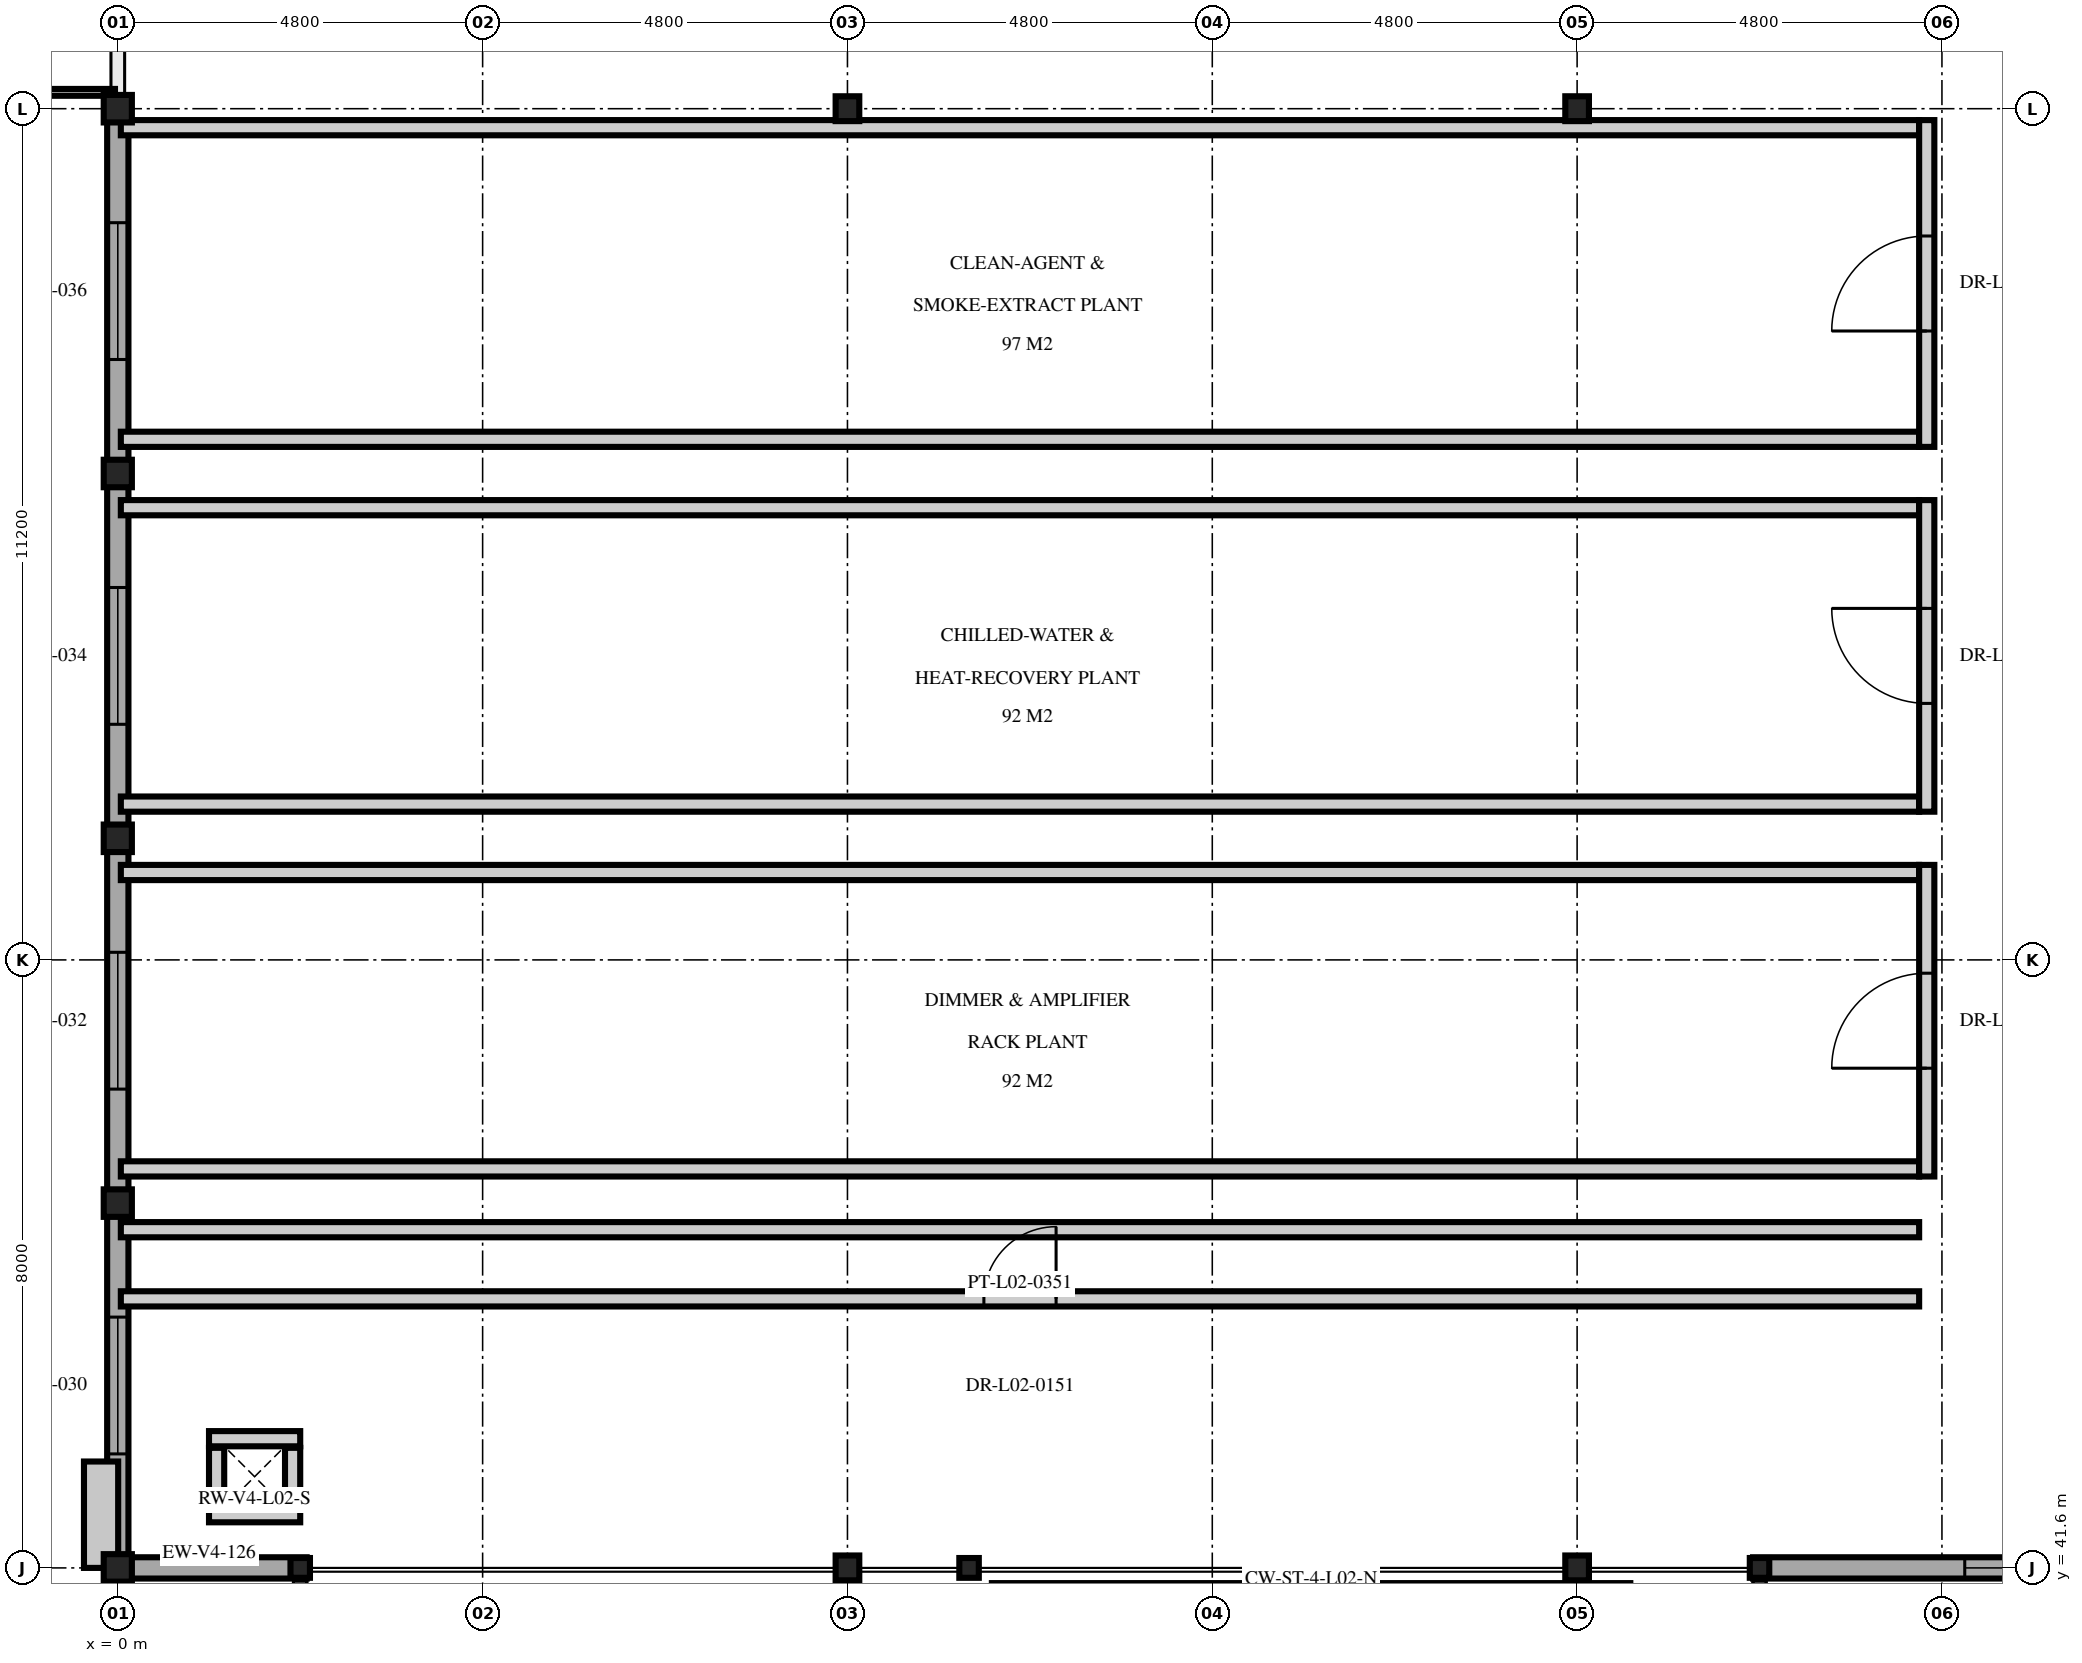
"""IFC4 building model, lengths in metres.
Left out: names, types, materials, properties, quantities, classifications, styles, units other than length and angle.
Written with IfcOpenShell. Run it as: python <this file> out.ifc"""

import sys

from ifc_helpers import new_model, si_unit, direction, frame, frame_2d, origin, origin_2d, place, context, subcontext, project, spatial, rectangle, i_section, extrude, element, fill, save


model = new_model("IFC4")
c1 = context("Model", 3, precision=1e-05, world=origin(), true_north=direction((0.0, 1.0)))
c2 = subcontext(c1, "Body", "Model", "MODEL_VIEW")
j1 = project(units=[si_unit("LENGTHUNIT", "METRE"), si_unit("PLANEANGLEUNIT", "RADIAN")], contexts=[c1])
p1 = place(None, origin())
s1 = spatial("IfcSite", under=j1, at=p1, CompositionType="ELEMENT")
p2 = place(p1, origin())
s2 = spatial("IfcBuilding", under=s1, at=p2, CompositionType="ELEMENT")
p3 = place(p2, frame((0.0, 0.0, 9.6)))
s3 = spatial("IfcBuildingStorey", under=s2, at=p3, CompositionType="ELEMENT", Elevation=9.6)
for number, where, z_axis, x_axis in (
    (1, (0.0, 41.6, 0.0), (0.0, 0.0, 1.0), (1.0, 0.0, 0.0)),
    (2, (0.0, 46.4, 0.0), (0.0, 0.0, 1.0), (1.0, 0.0, 0.0)),
    (3, (0.0, 51.2, 0.0), (0.0, 0.0, 1.0), (1.0, 0.0, 0.0)),
    (4, (0.0, 56.0, 0.0), (0.0, 0.0, 1.0), (1.0, 0.0, 0.0)),
    (5, (0.0, 60.8, 0.0), (0.0, 0.0, 1.0), (1.0, 0.0, 0.0)),
):
    element("IfcColumn", number, at=place(p3, frame(where, z_axis=z_axis, x_axis=x_axis)), inside=s3, PredefinedType="COLUMN", context=c2, shape_type="SweptSolid", body=[
        extrude(i_section(OverallWidth=0.371, OverallDepth=0.362, WebThickness=0.012, FlangeThickness=0.021, at=origin_2d()), origin(), (0.0, 0.0, 1.0), 4.5),
    ])
for number, where, z_axis, x_axis in (
    (6, (9.6, 41.6, 0.0), (0.0, 0.0, 1.0), (1.0, 0.0, 0.0)),
    (7, (9.6, 60.8, 0.0), (0.0, 0.0, 1.0), (1.0, 0.0, 0.0)),
    (8, (19.2, 41.6, 0.0), (0.0, 0.0, 1.0), (1.0, 0.0, 0.0)),
    (9, (19.2, 60.8, 0.0), (0.0, 0.0, 1.0), (1.0, 0.0, 0.0)),
):
    element("IfcColumn", number, at=place(p3, frame(where, z_axis=z_axis, x_axis=x_axis)), inside=s3, PredefinedType="COLUMN", context=c2, shape_type="SweptSolid", body=[
        extrude(i_section(OverallWidth=0.311, OverallDepth=0.327, WebThickness=0.016, FlangeThickness=0.025, at=origin_2d()), origin(), (0.0, 0.0, 1.0), 4.5),
    ])
for number, where, z_axis, x_axis in (
    (10, (2.4, 41.6, 0.0), (0.0, 0.0, 1.0), (1.0, 0.0, 0.0)),
    (11, (11.2, 41.6, 0.0), (0.0, 0.0, 1.0), (1.0, 0.0, 0.0)),
    (12, (21.6, 41.6, 0.0), (0.0, 0.0, 1.0), (1.0, 0.0, 0.0)),
):
    element("IfcColumn", number, at=place(p3, frame(where, z_axis=z_axis, x_axis=x_axis)), inside=s3, PredefinedType="COLUMN", context=c2, shape_type="SweptSolid", body=[
        extrude(i_section(OverallWidth=0.256, OverallDepth=0.26, WebThickness=0.01, FlangeThickness=0.017, at=origin_2d()), origin(), (0.0, 0.0, 1.0), 4.5),
    ])
p4 = place(p3, frame((11.5, 41.25, 0.0), z_axis=(0.0, 0.0, 1.0), x_axis=(1.0, 0.0, 0.0)))
e13 = element("IfcWall", 13, at=p4, inside=s3, PredefinedType="SHEAR", context=c2, shape_type="SweptSolid", body=[
    extrude(rectangle(XDim=8.4, YDim=0.3, at=frame_2d((4.2, 0.0))), origin(), (0.0, 0.0, 1.0), 4.26),
])
for number, where, z_axis, x_axis in (
    (14, (2.4, 42.3, 0.0), (0.0, 0.0, 1.0), (-1.0, 0.0, 0.0)),
    (15, (1.2, 43.3, 0.0), (0.0, 0.0, 1.0), (1.0, 0.0, 0.0)),
):
    element("IfcWall", number, at=place(p3, frame(where, z_axis=z_axis, x_axis=x_axis)), inside=s3, PredefinedType="PARTITIONING", context=c2, shape_type="SweptSolid", body=[
        extrude(rectangle(XDim=1.2, YDim=0.2, at=frame_2d((0.6, 0.0))), origin(), (0.0, 0.0, 1.0), 3.76),
    ])
for number, where, z_axis, x_axis in (
    (16, (1.3, 42.42, 0.0), (0.0, 0.0, 1.0), (0.0, 1.0, 0.0)),
    (17, (2.3, 43.18, 0.0), (0.0, 0.0, 1.0), (0.0, -1.0, 0.0)),
):
    element("IfcWall", number, at=place(p3, frame(where, z_axis=z_axis, x_axis=x_axis)), inside=s3, PredefinedType="PARTITIONING", context=c2, shape_type="SweptSolid", body=[
        extrude(rectangle(XDim=0.76, YDim=0.2, at=frame_2d((0.38, 0.0))), origin(), (0.0, 0.0, 1.0), 3.76),
    ])
p5 = place(p3, frame((2.485, 41.6, 0.0), z_axis=(0.0, 0.0, 1.0), x_axis=(-1.0, 0.0, 0.0)))
e18 = element("IfcWall", 18, at=p5, inside=s3, PredefinedType="SOLIDWALL", context=c2, shape_type="SweptSolid", body=[
    extrude(rectangle(XDim=2.57, YDim=0.28, at=frame_2d((1.285, 0.0))), origin(), (0.0, 0.0, 1.0), 3.702),
])
p6 = place(p3, frame((28.885, 41.6, 0.0), z_axis=(0.0, 0.0, 1.0), x_axis=(-1.0, 0.0, 0.0)))
e19 = element("IfcWall", 19, at=p6, inside=s3, PredefinedType="SOLIDWALL", context=c2, shape_type="SweptSolid", body=[
    extrude(rectangle(XDim=7.37, YDim=0.28, at=frame_2d((3.685, 0.0))), origin(), (0.0, 0.0, 1.0), 3.702),
])
p7 = place(p6, frame((2.785, 0.0, 1.0)))
e20 = element("IfcOpeningElement", 20, at=p7, cuts=e19, PredefinedType="OPENING", context=c2, shape_type="SweptSolid", body=[
    extrude(rectangle(XDim=1.8, YDim=2.1, at=frame_2d((0.9, 1.05))), frame((0.0, 0.15, 0.0), z_axis=(0.0, -1.0, 0.0), x_axis=(1.0, 0.0, 0.0)), (0.0, 0.0, 1.0), 0.3),
])
p8 = place(p3, frame((0.0, 41.515, 0.0), z_axis=(0.0, 0.0, 1.0), x_axis=(0.0, 1.0, 0.0)))
e21 = element("IfcWall", 21, at=p8, inside=s3, PredefinedType="SOLIDWALL", context=c2, shape_type="SweptSolid", body=[
    extrude(rectangle(XDim=4.97, YDim=0.28, at=frame_2d((2.485, 0.0))), origin(), (0.0, 0.0, 1.0), 3.635),
])
p9 = place(p8, frame((1.585, 0.0, 1.0)))
e22 = element("IfcOpeningElement", 22, at=p9, cuts=e21, PredefinedType="OPENING", context=c2, shape_type="SweptSolid", body=[
    extrude(rectangle(XDim=1.8, YDim=2.1, at=frame_2d((0.9, 1.05))), frame((0.0, 0.15, 0.0), z_axis=(0.0, -1.0, 0.0), x_axis=(1.0, 0.0, 0.0)), (0.0, 0.0, 1.0), 0.3),
])
p10 = place(p3, frame((0.0, 46.315, 0.0), z_axis=(0.0, 0.0, 1.0), x_axis=(0.0, 1.0, 0.0)))
e23 = element("IfcWall", 23, at=p10, inside=s3, PredefinedType="SOLIDWALL", context=c2, shape_type="SweptSolid", body=[
    extrude(rectangle(XDim=4.97, YDim=0.28, at=frame_2d((2.485, 0.0))), origin(), (0.0, 0.0, 1.0), 3.635),
])
p11 = place(p10, frame((1.585, 0.0, 1.0)))
e24 = element("IfcOpeningElement", 24, at=p11, cuts=e23, PredefinedType="OPENING", context=c2, shape_type="SweptSolid", body=[
    extrude(rectangle(XDim=1.8, YDim=2.1, at=frame_2d((0.9, 1.05))), frame((0.0, 0.15, 0.0), z_axis=(0.0, -1.0, 0.0), x_axis=(1.0, 0.0, 0.0)), (0.0, 0.0, 1.0), 0.3),
])
p12 = place(p3, frame((0.0, 51.115, 0.0), z_axis=(0.0, 0.0, 1.0), x_axis=(0.0, 1.0, 0.0)))
e25 = element("IfcWall", 25, at=p12, inside=s3, PredefinedType="SOLIDWALL", context=c2, shape_type="SweptSolid", body=[
    extrude(rectangle(XDim=4.97, YDim=0.28, at=frame_2d((2.485, 0.0))), origin(), (0.0, 0.0, 1.0), 3.635),
])
p13 = place(p12, frame((1.585, 0.0, 1.0)))
e26 = element("IfcOpeningElement", 26, at=p13, cuts=e25, PredefinedType="OPENING", context=c2, shape_type="SweptSolid", body=[
    extrude(rectangle(XDim=1.8, YDim=2.1, at=frame_2d((0.9, 1.05))), frame((0.0, 0.15, 0.0), z_axis=(0.0, -1.0, 0.0), x_axis=(1.0, 0.0, 0.0)), (0.0, 0.0, 1.0), 0.3),
])
p14 = place(p3, frame((0.0, 55.915, 0.0), z_axis=(0.0, 0.0, 1.0), x_axis=(0.0, 1.0, 0.0)))
e27 = element("IfcWall", 27, at=p14, inside=s3, PredefinedType="SOLIDWALL", context=c2, shape_type="SweptSolid", body=[
    extrude(rectangle(XDim=4.97, YDim=0.28, at=frame_2d((2.485, 0.0))), origin(), (0.0, 0.0, 1.0), 3.635),
])
p15 = place(p14, frame((1.585, 0.0, 1.0)))
e28 = element("IfcOpeningElement", 28, at=p15, cuts=e27, PredefinedType="OPENING", context=c2, shape_type="SweptSolid", body=[
    extrude(rectangle(XDim=1.8, YDim=2.1, at=frame_2d((0.9, 1.05))), frame((0.0, 0.15, 0.0), z_axis=(0.0, -1.0, 0.0), x_axis=(1.0, 0.0, 0.0)), (0.0, 0.0, 1.0), 0.3),
])
p16 = place(p3, frame((0.04, 45.14, 0.0), z_axis=(0.0, 0.0, 1.0), x_axis=(1.0, 0.0, 0.0)))
e29 = element("IfcWall", 29, at=p16, inside=s3, PredefinedType="PARTITIONING", context=c2, shape_type="SweptSolid", body=[
    extrude(rectangle(XDim=23.66, YDim=0.2, at=frame_2d((11.83, 0.0))), origin(), (0.0, 0.0, 1.0), 3.702),
])
p17 = place(p16, frame((11.355, 0.0, 0.0)))
e30 = element("IfcOpeningElement", 30, at=p17, cuts=e29, PredefinedType="OPENING", context=c2, shape_type="SweptSolid", body=[
    extrude(rectangle(XDim=0.95, YDim=2.1, at=frame_2d((0.475, 1.05))), frame((0.0, 0.11, 0.0), z_axis=(0.0, -1.0, 0.0), x_axis=(1.0, 0.0, 0.0)), (0.0, 0.0, 1.0), 0.22),
])
for number, where, z_axis, x_axis in (
    (31, (0.04, 46.05, 0.0), (0.0, 0.0, 1.0), (1.0, 0.0, 0.0)),
    (32, (0.04, 46.85, 0.0), (0.0, 0.0, 1.0), (1.0, 0.0, 0.0)),
    (33, (0.04, 50.75, 0.0), (0.0, 0.0, 1.0), (1.0, 0.0, 0.0)),
):
    element("IfcWall", number, at=place(p3, frame(where, z_axis=z_axis, x_axis=x_axis)), inside=s3, PredefinedType="PARTITIONING", context=c2, shape_type="SweptSolid", body=[
        extrude(rectangle(XDim=23.66, YDim=0.2, at=frame_2d((11.83, 0.0))), origin(), (0.0, 0.0, 1.0), 3.702),
    ])
p18 = place(p3, frame((23.8, 46.75, 0.0), z_axis=(0.0, 0.0, 1.0), x_axis=(0.0, 1.0, 0.0)))
e34 = element("IfcWall", 34, at=p18, inside=s3, PredefinedType="PARTITIONING", context=c2, shape_type="SweptSolid", body=[
    extrude(rectangle(XDim=4.1, YDim=0.2, at=frame_2d((2.05, 0.0))), origin(), (0.0, 0.0, 1.0), 4.26),
])
p19 = place(p18, frame((1.425, 0.0, 0.0)))
e35 = element("IfcOpeningElement", 35, at=p19, cuts=e34, PredefinedType="OPENING", context=c2, shape_type="SweptSolid", body=[
    extrude(rectangle(XDim=1.25, YDim=2.25, at=frame_2d((0.625, 1.125))), frame((0.0, 0.11, 0.0), z_axis=(0.0, -1.0, 0.0), x_axis=(1.0, 0.0, 0.0)), (0.0, 0.0, 1.0), 0.22),
])
for number, where, z_axis, x_axis in (
    (36, (0.04, 51.65, 0.0), (0.0, 0.0, 1.0), (1.0, 0.0, 0.0)),
    (37, (0.04, 55.55, 0.0), (0.0, 0.0, 1.0), (1.0, 0.0, 0.0)),
):
    element("IfcWall", number, at=place(p3, frame(where, z_axis=z_axis, x_axis=x_axis)), inside=s3, PredefinedType="PARTITIONING", context=c2, shape_type="SweptSolid", body=[
        extrude(rectangle(XDim=23.66, YDim=0.2, at=frame_2d((11.83, 0.0))), origin(), (0.0, 0.0, 1.0), 3.702),
    ])
p20 = place(p3, frame((23.8, 51.55, 0.0), z_axis=(0.0, 0.0, 1.0), x_axis=(0.0, 1.0, 0.0)))
e38 = element("IfcWall", 38, at=p20, inside=s3, PredefinedType="PARTITIONING", context=c2, shape_type="SweptSolid", body=[
    extrude(rectangle(XDim=4.1, YDim=0.2, at=frame_2d((2.05, 0.0))), origin(), (0.0, 0.0, 1.0), 4.26),
])
p21 = place(p20, frame((1.425, 0.0, 0.0)))
e39 = element("IfcOpeningElement", 39, at=p21, cuts=e38, PredefinedType="OPENING", context=c2, shape_type="SweptSolid", body=[
    extrude(rectangle(XDim=1.25, YDim=2.25, at=frame_2d((0.625, 1.125))), frame((0.0, 0.11, 0.0), z_axis=(0.0, -1.0, 0.0), x_axis=(1.0, 0.0, 0.0)), (0.0, 0.0, 1.0), 0.22),
])
for number, where, z_axis, x_axis in (
    (40, (0.04, 56.45, 0.0), (0.0, 0.0, 1.0), (1.0, 0.0, 0.0)),
    (41, (0.04, 60.55, 0.0), (0.0, 0.0, 1.0), (1.0, 0.0, 0.0)),
):
    element("IfcWall", number, at=place(p3, frame(where, z_axis=z_axis, x_axis=x_axis)), inside=s3, PredefinedType="PARTITIONING", context=c2, shape_type="SweptSolid", body=[
        extrude(rectangle(XDim=23.66, YDim=0.2, at=frame_2d((11.83, 0.0))), origin(), (0.0, 0.0, 1.0), 3.702),
    ])
p22 = place(p3, frame((23.8, 56.35, 0.0), z_axis=(0.0, 0.0, 1.0), x_axis=(0.0, 1.0, 0.0)))
e42 = element("IfcWall", 42, at=p22, inside=s3, PredefinedType="PARTITIONING", context=c2, shape_type="SweptSolid", body=[
    extrude(rectangle(XDim=4.3, YDim=0.2, at=frame_2d((2.15, 0.0))), origin(), (0.0, 0.0, 1.0), 3.735),
])
p23 = place(p22, frame((1.525, 0.0, 0.0)))
e43 = element("IfcOpeningElement", 43, at=p23, cuts=e42, PredefinedType="OPENING", context=c2, shape_type="SweptSolid", body=[
    extrude(rectangle(XDim=1.25, YDim=2.25, at=frame_2d((0.625, 1.125))), frame((0.0, 0.11, 0.0), z_axis=(0.0, -1.0, 0.0), x_axis=(1.0, 0.0, 0.0)), (0.0, 0.0, 1.0), 0.22),
])
p24 = place(p7, origin())
e44 = element("IfcWindow", 44, at=p24, inside=s3, PartitioningType="SINGLE_PANEL", PredefinedType="WINDOW", context=c2, shape_type="SweptSolid", body=[
    extrude(rectangle(XDim=1.8, YDim=2.1, at=frame_2d((0.9, 1.05))), frame((0.0, 0.03, 0.0), z_axis=(0.0, -1.0, 0.0), x_axis=(1.0, 0.0, 0.0)), (0.0, 0.0, 1.0), 0.06),
])
fill(e20, e44)
p25 = place(p9, origin())
e45 = element("IfcWindow", 45, at=p25, inside=s3, PartitioningType="SINGLE_PANEL", PredefinedType="WINDOW", context=c2, shape_type="SweptSolid", body=[
    extrude(rectangle(XDim=1.8, YDim=2.1, at=frame_2d((0.9, 1.05))), frame((0.0, 0.03, 0.0), z_axis=(0.0, -1.0, 0.0), x_axis=(1.0, 0.0, 0.0)), (0.0, 0.0, 1.0), 0.06),
])
fill(e22, e45)
p26 = place(p11, origin())
e46 = element("IfcWindow", 46, at=p26, inside=s3, PartitioningType="SINGLE_PANEL", PredefinedType="WINDOW", context=c2, shape_type="SweptSolid", body=[
    extrude(rectangle(XDim=1.8, YDim=2.1, at=frame_2d((0.9, 1.05))), frame((0.0, 0.03, 0.0), z_axis=(0.0, -1.0, 0.0), x_axis=(1.0, 0.0, 0.0)), (0.0, 0.0, 1.0), 0.06),
])
fill(e24, e46)
p27 = place(p13, origin())
e47 = element("IfcWindow", 47, at=p27, inside=s3, PartitioningType="SINGLE_PANEL", PredefinedType="WINDOW", context=c2, shape_type="SweptSolid", body=[
    extrude(rectangle(XDim=1.8, YDim=2.1, at=frame_2d((0.9, 1.05))), frame((0.0, 0.03, 0.0), z_axis=(0.0, -1.0, 0.0), x_axis=(1.0, 0.0, 0.0)), (0.0, 0.0, 1.0), 0.06),
])
fill(e26, e47)
p28 = place(p15, origin())
e48 = element("IfcWindow", 48, at=p28, inside=s3, PartitioningType="SINGLE_PANEL", PredefinedType="WINDOW", context=c2, shape_type="SweptSolid", body=[
    extrude(rectangle(XDim=1.8, YDim=2.1, at=frame_2d((0.9, 1.05))), frame((0.0, 0.03, 0.0), z_axis=(0.0, -1.0, 0.0), x_axis=(1.0, 0.0, 0.0)), (0.0, 0.0, 1.0), 0.06),
])
fill(e28, e48)
p29 = place(p17, origin())
e49 = element("IfcDoor", 49, at=p29, inside=s3, OperationType="SINGLE_SWING_RIGHT", PredefinedType="DOOR", context=c2, shape_type="SweptSolid", body=[
    extrude(rectangle(XDim=0.95, YDim=2.1, at=frame_2d((0.475, 1.05))), frame((0.0, 0.025, 0.0), z_axis=(0.0, -1.0, 0.0), x_axis=(1.0, 0.0, 0.0)), (0.0, 0.0, 1.0), 0.05),
])
fill(e30, e49)
p30 = place(p19, origin())
e50 = element("IfcDoor", 50, at=p30, inside=s3, OperationType="SINGLE_SWING_LEFT", PredefinedType="DOOR", context=c2, shape_type="SweptSolid", body=[
    extrude(rectangle(XDim=1.25, YDim=2.25, at=frame_2d((0.625, 1.125))), frame((0.0, 0.025, 0.0), z_axis=(0.0, -1.0, 0.0), x_axis=(1.0, 0.0, 0.0)), (0.0, 0.0, 1.0), 0.05),
])
fill(e35, e50)
p31 = place(p21, origin())
e51 = element("IfcDoor", 51, at=p31, inside=s3, OperationType="SINGLE_SWING_RIGHT", PredefinedType="DOOR", context=c2, shape_type="SweptSolid", body=[
    extrude(rectangle(XDim=1.25, YDim=2.25, at=frame_2d((0.625, 1.125))), frame((0.0, 0.025, 0.0), z_axis=(0.0, -1.0, 0.0), x_axis=(1.0, 0.0, 0.0)), (0.0, 0.0, 1.0), 0.05),
])
fill(e39, e51)
p32 = place(p23, origin())
e52 = element("IfcDoor", 52, at=p32, inside=s3, OperationType="SINGLE_SWING_LEFT", PredefinedType="DOOR", context=c2, shape_type="SweptSolid", body=[
    extrude(rectangle(XDim=1.25, YDim=2.25, at=frame_2d((0.625, 1.125))), frame((0.0, 0.025, 0.0), z_axis=(0.0, -1.0, 0.0), x_axis=(1.0, 0.0, 0.0)), (0.0, 0.0, 1.0), 0.05),
])
fill(e43, e52)
save(model, sys.argv[1])
